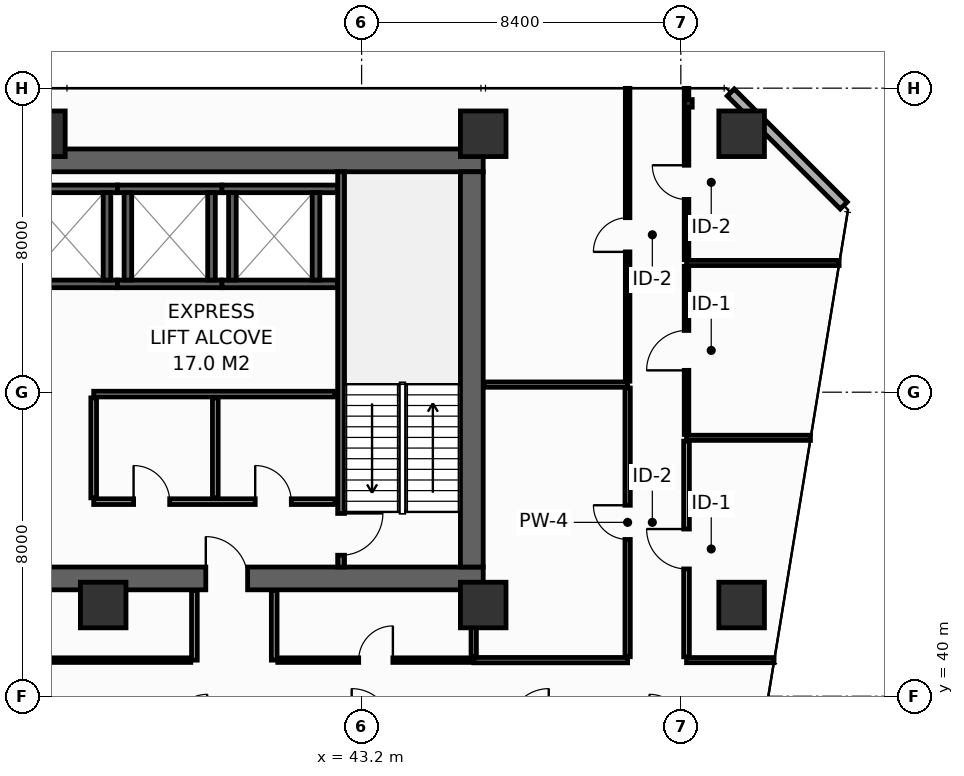
"""IFC4 building model, lengths in metres.
Left out: names, types, materials, properties, quantities, classifications, styles, units other than length and angle.
Written with IfcOpenShell. Run it as: python <this file> out.ifc"""

import sys

from ifc_helpers import new_model, si_unit, direction, frame, frame_2d, origin, origin_2d, place, context, subcontext, project, spatial, rectangle, hollow_rectangle, extrude, element, fill, save


model = new_model("IFC4")
c1 = context("Model", 3, precision=1e-05, world=origin(), true_north=direction((0.0, 1.0)))
c2 = subcontext(c1, "Body", "Model", "MODEL_VIEW")
j1 = project(units=[si_unit("LENGTHUNIT", "METRE"), si_unit("PLANEANGLEUNIT", "RADIAN")], contexts=[c1])
p1 = place(None, origin())
s1 = spatial("IfcSite", under=j1, at=p1, CompositionType="ELEMENT")
p2 = place(p1, origin())
s2 = spatial("IfcBuilding", under=s1, at=p2, CompositionType="ELEMENT")
p3 = place(p2, frame((0.0, 0.0, 97.2)))
s3 = spatial("IfcBuildingStorey", under=s2, at=p3, CompositionType="ELEMENT", Elevation=97.2)
p4 = place(p3, frame((13.5, 43.1, 0.0), z_axis=(0.0, 0.0, 1.0), x_axis=(1.0, 0.0, 0.0)))
e1 = element("IfcWall", 1, at=p4, inside=s3, PredefinedType="SHEAR", context=c2, shape_type="SweptSolid", body=[
    extrude(rectangle(XDim=32.9, YDim=0.6, at=frame_2d((16.45, 0.0))), origin(), (0.0, 0.0, 1.0), 4.15),
])
p5 = place(p4, frame((5.4, 0.0, 0.0)))
e2 = element("IfcOpeningElement", 2, at=p5, cuts=e1, PredefinedType="OPENING", context=c2, shape_type="SweptSolid", body=[
    extrude(rectangle(XDim=1.1, YDim=2.15, at=frame_2d((0.55, 1.075))), frame((0.0, 0.31, 0.0), z_axis=(0.0, -1.0, 0.0), x_axis=(1.0, 0.0, 0.0)), (0.0, 0.0, 1.0), 0.62),
])
p6 = place(p4, frame((25.6, 0.0, 0.0)))
e3 = element("IfcOpeningElement", 3, at=p6, cuts=e1, PredefinedType="OPENING", context=c2, shape_type="SweptSolid", body=[
    extrude(rectangle(XDim=1.1, YDim=2.15, at=frame_2d((0.55, 1.075))), frame((0.0, 0.31, 0.0), z_axis=(0.0, -1.0, 0.0), x_axis=(1.0, 0.0, 0.0)), (0.0, 0.0, 1.0), 0.62),
])
p7 = place(p3, frame((13.5, 54.1, 0.0), z_axis=(0.0, 0.0, 1.0), x_axis=(1.0, 0.0, 0.0)))
e4 = element("IfcWall", 4, at=p7, inside=s3, PredefinedType="SHEAR", context=c2, shape_type="SweptSolid", body=[
    extrude(rectangle(XDim=32.9, YDim=0.6, at=frame_2d((16.45, 0.0))), origin(), (0.0, 0.0, 1.0), 4.15),
])
p8 = place(p3, frame((46.1, 43.4, 0.0), z_axis=(0.0, 0.0, 1.0), x_axis=(0.0, 1.0, 0.0)))
e5 = element("IfcWall", 5, at=p8, inside=s3, PredefinedType="SHEAR", context=c2, shape_type="SweptSolid", body=[
    extrude(rectangle(XDim=10.4, YDim=0.6, at=frame_2d((5.2, 0.0))), origin(), (0.0, 0.0, 1.0), 4.15),
])
for number, where, z_axis, x_axis in (
    (6, (34.8, 54.8, 0.0), (0.0, 0.0, 1.0), (1.0, 0.0, 0.0)),
    (7, (46.4, 54.8, 0.0), (0.0, 0.0, 1.0), (1.0, 0.0, 0.0)),
    (8, (53.2, 54.8, 0.0), (0.0, 0.0, 1.0), (1.0, 0.0, 0.0)),
    (9, (36.4, 42.4, 0.0), (0.0, 0.0, 1.0), (1.0, 0.0, 0.0)),
    (10, (46.4, 42.4, 0.0), (0.0, 0.0, 1.0), (1.0, 0.0, 0.0)),
    (11, (53.2, 42.4, 0.0), (0.0, 0.0, 1.0), (1.0, 0.0, 0.0)),
):
    element("IfcColumn", number, at=place(p3, frame(where, z_axis=z_axis, x_axis=x_axis)), inside=s3, PredefinedType="COLUMN", context=c2, shape_type="SweptSolid", body=[
        extrude(hollow_rectangle(XDim=1.2, YDim=1.2, WallThickness=0.055, at=origin_2d()), origin(), (0.0, 0.0, 1.0), 4.4),
    ])
p9 = place(p3, frame((51.8, 55.6, 0.0), z_axis=(0.0, 0.0, 1.0), x_axis=(1.0, 0.0, 0.0)))
e12 = element("IfcColumn", 12, at=p9, inside=s3, PredefinedType="PILASTER", context=c2, shape_type="SweptSolid", body=[
    extrude(hollow_rectangle(XDim=0.2, YDim=0.2, WallThickness=0.01, at=origin_2d()), origin(), (0.0, 0.0, 1.0), 4.4),
])
for number, where, z_axis, x_axis in (
    (13, (33.95, 50.85, 0.0), (0.0, 0.0, 1.0), (1.0, 0.0, 0.0)),
    (14, (33.95, 53.35, 0.0), (0.0, 0.0, 1.0), (1.0, 0.0, 0.0)),
):
    element("IfcWall", number, at=place(p3, frame(where, z_axis=z_axis, x_axis=x_axis)), inside=s3, PredefinedType="SHEAR", context=c2, shape_type="SweptSolid", body=[
        extrude(rectangle(XDim=2.825, YDim=0.2, at=frame_2d((1.413, 0.0))), origin(), (0.0, 0.0, 1.0), 4.15),
    ])
p10 = place(p3, frame((36.5, 50.95, 0.0), z_axis=(0.0, 0.0, 1.0), x_axis=(0.0, 1.0, 0.0)))
e15 = element("IfcWall", 15, at=p10, inside=s3, PredefinedType="SHEAR", context=c2, shape_type="SweptSolid", body=[
    extrude(rectangle(XDim=2.3, YDim=0.2, at=frame_2d((1.15, 0.0))), origin(), (0.0, 0.0, 1.0), 4.15),
])
for number, where, z_axis, x_axis in (
    (16, (36.775, 50.85, 0.0), (0.0, 0.0, 1.0), (1.0, 0.0, 0.0)),
    (17, (36.775, 53.35, 0.0), (0.0, 0.0, 1.0), (1.0, 0.0, 0.0)),
):
    element("IfcWall", number, at=place(p3, frame(where, z_axis=z_axis, x_axis=x_axis)), inside=s3, PredefinedType="SHEAR", context=c2, shape_type="SweptSolid", body=[
        extrude(rectangle(XDim=2.75, YDim=0.2, at=frame_2d((1.375, 0.0))), origin(), (0.0, 0.0, 1.0), 4.15),
    ])
for number, where, z_axis, x_axis in (
    (18, (37.05, 50.95, 0.0), (0.0, 0.0, 1.0), (0.0, 1.0, 0.0)),
    (19, (39.25, 50.95, 0.0), (0.0, 0.0, 1.0), (0.0, 1.0, 0.0)),
):
    element("IfcWall", number, at=place(p3, frame(where, z_axis=z_axis, x_axis=x_axis)), inside=s3, PredefinedType="SHEAR", context=c2, shape_type="SweptSolid", body=[
        extrude(rectangle(XDim=2.3, YDim=0.2, at=frame_2d((1.15, 0.0))), origin(), (0.0, 0.0, 1.0), 4.15),
    ])
for number, where, z_axis, x_axis in (
    (20, (39.525, 50.85, 0.0), (0.0, 0.0, 1.0), (1.0, 0.0, 0.0)),
    (21, (39.525, 53.35, 0.0), (0.0, 0.0, 1.0), (1.0, 0.0, 0.0)),
):
    element("IfcWall", number, at=place(p3, frame(where, z_axis=z_axis, x_axis=x_axis)), inside=s3, PredefinedType="SHEAR", context=c2, shape_type="SweptSolid", body=[
        extrude(rectangle(XDim=3.045, YDim=0.2, at=frame_2d((1.522, 0.0))), origin(), (0.0, 0.0, 1.0), 4.15),
    ])
for number, where, z_axis, x_axis in (
    (22, (39.8, 50.95, 0.0), (0.0, 0.0, 1.0), (0.0, 1.0, 0.0)),
    (23, (42.0, 50.95, 0.0), (0.0, 0.0, 1.0), (0.0, 1.0, 0.0)),
):
    element("IfcWall", number, at=place(p3, frame(where, z_axis=z_axis, x_axis=x_axis)), inside=s3, PredefinedType="SHEAR", context=c2, shape_type="SweptSolid", body=[
        extrude(rectangle(XDim=2.3, YDim=0.2, at=frame_2d((1.15, 0.0))), origin(), (0.0, 0.0, 1.0), 4.15),
    ])
p11 = place(p3, frame((42.66, 53.8, 0.0), z_axis=(0.0, 0.0, 1.0), x_axis=(0.0, -1.0, 0.0)))
e24 = element("IfcWall", 24, at=p11, inside=s3, PredefinedType="SHEAR", context=c2, shape_type="SweptSolid", body=[
    extrude(rectangle(XDim=10.4, YDim=0.18, at=frame_2d((5.2, 0.0))), origin(), (0.0, 0.0, 1.0), 4.15),
])
p12 = place(p11, frame((8.99, 0.0, 0.0)))
e25 = element("IfcOpeningElement", 25, at=p12, cuts=e24, PredefinedType="OPENING", context=c2, shape_type="SweptSolid", body=[
    extrude(rectangle(XDim=1.1, YDim=2.15, at=frame_2d((0.55, 1.075))), frame((0.0, 0.1, 0.0), z_axis=(0.0, -1.0, 0.0), x_axis=(1.0, 0.0, 0.0)), (0.0, 0.0, 1.0), 0.2),
])
p13 = place(p3, frame((36.15, 45.12, 0.0), z_axis=(0.0, 0.0, 1.0), x_axis=(1.0, 0.0, 0.0)))
e26 = element("IfcWall", 26, at=p13, inside=s3, PredefinedType="PARTITIONING", context=c2, shape_type="SweptSolid", body=[
    extrude(rectangle(XDim=6.35, YDim=0.15, at=frame_2d((3.175, 0.0))), origin(), (0.0, 0.0, 1.0), 4.15),
])
p14 = place(p13, frame((1.05, 0.0, 0.0)))
e27 = element("IfcOpeningElement", 27, at=p14, cuts=e26, PredefinedType="OPENING", context=c2, shape_type="SweptSolid", body=[
    extrude(rectangle(XDim=0.95, YDim=2.15, at=frame_2d((0.475, 1.075))), frame((0.0, 0.085, 0.0), z_axis=(0.0, -1.0, 0.0), x_axis=(1.0, 0.0, 0.0)), (0.0, 0.0, 1.0), 0.17),
])
p15 = place(p13, frame((4.25, 0.0, 0.0)))
e28 = element("IfcOpeningElement", 28, at=p15, cuts=e26, PredefinedType="OPENING", context=c2, shape_type="SweptSolid", body=[
    extrude(rectangle(XDim=0.95, YDim=2.15, at=frame_2d((0.475, 1.075))), frame((0.0, 0.085, 0.0), z_axis=(0.0, -1.0, 0.0), x_axis=(1.0, 0.0, 0.0)), (0.0, 0.0, 1.0), 0.17),
])
p16 = place(p3, frame((36.15, 47.95, 0.0), z_axis=(0.0, 0.0, 1.0), x_axis=(1.0, 0.0, 0.0)))
e29 = element("IfcWall", 29, at=p16, inside=s3, PredefinedType="PARTITIONING", context=c2, shape_type="SweptSolid", body=[
    extrude(rectangle(XDim=6.35, YDim=0.15, at=frame_2d((3.175, 0.0))), origin(), (0.0, 0.0, 1.0), 4.15),
])
for number, where, z_axis, x_axis in (
    (30, (36.15, 45.22, 0.0), (0.0, 0.0, 1.0), (0.0, 1.0, 0.0)),
    (31, (39.35, 45.22, 0.0), (0.0, 0.0, 1.0), (0.0, 1.0, 0.0)),
):
    element("IfcWall", number, at=place(p3, frame(where, z_axis=z_axis, x_axis=x_axis)), inside=s3, PredefinedType="PARTITIONING", context=c2, shape_type="SweptSolid", body=[
        extrude(rectangle(XDim=2.63, YDim=0.15, at=frame_2d((1.315, 0.0))), origin(), (0.0, 0.0, 1.0), 4.15),
    ])
p17 = place(p3, frame((55.887, 52.913, 0.0), z_axis=(0.0, 0.0, 1.0), x_axis=(-0.707106781187, 0.707106781187, 0.0)))
e32 = element("IfcWall", 32, at=p17, inside=s3, PredefinedType="STANDARD", context=c2, shape_type="SweptSolid", body=[
    extrude(rectangle(XDim=4.206, YDim=0.26, at=frame_2d((2.103, 0.0))), origin(), (0.0, 0.0, 1.0), 4.15),
])
p18 = place(p3, frame((46.15, 40.95, 0.0), z_axis=(0.0, 0.0, 1.0), x_axis=(1.0, 0.0, 0.0)))
e33 = element("IfcWall", 33, at=p18, inside=s3, PredefinedType="PARTITIONING", context=c2, shape_type="SweptSolid", body=[
    extrude(rectangle(XDim=4.05, YDim=0.14, at=frame_2d((2.025, 0.0))), origin(), (0.0, 0.0, 1.0), 4.15),
])
p19 = place(p3, frame((46.15, 41.04, 0.0), z_axis=(0.0, 0.0, 1.0), x_axis=(0.0, 1.0, 0.0)))
e34 = element("IfcWall", 34, at=p19, inside=s3, PredefinedType="PARTITIONING", context=c2, shape_type="SweptSolid", body=[
    extrude(rectangle(XDim=1.74, YDim=0.14, at=frame_2d((0.87, 0.0))), origin(), (0.0, 0.0, 1.0), 4.15),
])
p20 = place(p3, frame((46.42, 48.2, 0.0), z_axis=(0.0, 0.0, 1.0), x_axis=(1.0, 0.0, 0.0)))
e35 = element("IfcWall", 35, at=p20, inside=s3, PredefinedType="PARTITIONING", context=c2, shape_type="SweptSolid", body=[
    extrude(rectangle(XDim=3.78, YDim=0.14, at=frame_2d((1.89, 0.0))), origin(), (0.0, 0.0, 1.0), 4.15),
])
p21 = place(p3, frame((50.2, 41.04, 0.0), z_axis=(0.0, 0.0, 1.0), x_axis=(0.0, 1.0, 0.0)))
e36 = element("IfcWall", 36, at=p21, inside=s3, PredefinedType="PARTITIONING", context=c2, shape_type="SweptSolid", body=[
    extrude(rectangle(XDim=7.07, YDim=0.14, at=frame_2d((3.535, 0.0))), origin(), (0.0, 0.0, 1.0), 3.335),
])
p22 = place(p21, frame((3.085, 0.0, 0.0)))
e37 = element("IfcOpeningElement", 37, at=p22, cuts=e36, PredefinedType="OPENING", context=c2, shape_type="SweptSolid", body=[
    extrude(rectangle(XDim=0.9, YDim=2.1, at=frame_2d((0.45, 1.05))), frame((0.0, 0.08, 0.0), z_axis=(0.0, -1.0, 0.0), x_axis=(1.0, 0.0, 0.0)), (0.0, 0.0, 1.0), 0.16),
])
p23 = place(p3, frame((50.2, 48.29, 0.0), z_axis=(0.0, 0.0, 1.0), x_axis=(0.0, 1.0, 0.0)))
e38 = element("IfcWall", 38, at=p23, inside=s3, PredefinedType="PARTITIONING", context=c2, shape_type="SweptSolid", body=[
    extrude(rectangle(XDim=7.705, YDim=0.12, at=frame_2d((3.853, 0.0))), origin(), (0.0, 0.0, 1.0), 3.435),
])
p24 = place(p23, frame((3.402, 0.0, 0.0)))
e39 = element("IfcOpeningElement", 39, at=p24, cuts=e38, PredefinedType="OPENING", context=c2, shape_type="SweptSolid", body=[
    extrude(rectangle(XDim=0.9, YDim=2.1, at=frame_2d((0.45, 1.05))), frame((0.0, 0.07, 0.0), z_axis=(0.0, -1.0, 0.0), x_axis=(1.0, 0.0, 0.0)), (0.0, 0.0, 1.0), 0.14),
])
p25 = place(p3, frame((51.75, 40.95, 0.0), z_axis=(0.0, 0.0, 1.0), x_axis=(1.0, 0.0, 0.0)))
e40 = element("IfcWall", 40, at=p25, inside=s3, PredefinedType="PARTITIONING", context=c2, shape_type="SweptSolid", body=[
    extrude(rectangle(XDim=2.303, YDim=0.135, at=frame_2d((1.151, 0.0))), origin(), (0.0, 0.0, 1.0), 3.635),
])
p26 = place(p3, frame((51.75, 46.8, 0.0), z_axis=(0.0, 0.0, 1.0), x_axis=(1.0, 0.0, 0.0)))
e41 = element("IfcWall", 41, at=p26, inside=s3, PredefinedType="PARTITIONING", context=c2, shape_type="SweptSolid", body=[
    extrude(rectangle(XDim=3.262, YDim=0.135, at=frame_2d((1.631, 0.0))), origin(), (0.0, 0.0, 1.0), 3.335),
])
p27 = place(p3, frame((51.75, 51.4, 0.0), z_axis=(0.0, 0.0, 1.0), x_axis=(1.0, 0.0, 0.0)))
e42 = element("IfcWall", 42, at=p27, inside=s3, PredefinedType="PARTITIONING", context=c2, shape_type="SweptSolid", body=[
    extrude(rectangle(XDim=4.015, YDim=0.135, at=frame_2d((2.008, 0.0))), origin(), (0.0, 0.0, 1.0), 3.335),
])
p28 = place(p3, frame((51.75, 41.038, 0.0), z_axis=(0.0, 0.0, 1.0), x_axis=(0.0, 1.0, 0.0)))
e43 = element("IfcWall", 43, at=p28, inside=s3, PredefinedType="PARTITIONING", context=c2, shape_type="SweptSolid", body=[
    extrude(rectangle(XDim=5.675, YDim=0.15, at=frame_2d((2.837, 0.0))), origin(), (0.0, 0.0, 1.0), 3.335),
])
p29 = place(p28, frame((2.312, 0.0, 0.0)))
e44 = element("IfcOpeningElement", 44, at=p29, cuts=e43, PredefinedType="OPENING", context=c2, shape_type="SweptSolid", body=[
    extrude(rectangle(XDim=1.05, YDim=2.15, at=frame_2d((0.525, 1.075))), frame((0.0, 0.085, 0.0), z_axis=(0.0, -1.0, 0.0), x_axis=(1.0, 0.0, 0.0)), (0.0, 0.0, 1.0), 0.17),
])
p30 = place(p3, frame((51.75, 46.887, 0.0), z_axis=(0.0, 0.0, 1.0), x_axis=(0.0, 1.0, 0.0)))
e45 = element("IfcWall", 45, at=p30, inside=s3, PredefinedType="PARTITIONING", context=c2, shape_type="SweptSolid", body=[
    extrude(rectangle(XDim=4.425, YDim=0.12, at=frame_2d((2.212, 0.0))), origin(), (0.0, 0.0, 1.0), 4.15),
])
p31 = place(p30, frame((1.687, 0.0, 0.0)))
e46 = element("IfcOpeningElement", 46, at=p31, cuts=e45, PredefinedType="OPENING", context=c2, shape_type="SweptSolid", body=[
    extrude(rectangle(XDim=1.05, YDim=2.15, at=frame_2d((0.525, 1.075))), frame((0.0, 0.07, 0.0), z_axis=(0.0, -1.0, 0.0), x_axis=(1.0, 0.0, 0.0)), (0.0, 0.0, 1.0), 0.14),
])
p32 = place(p3, frame((51.75, 51.488, 0.0), z_axis=(0.0, 0.0, 1.0), x_axis=(0.0, 1.0, 0.0)))
e47 = element("IfcWall", 47, at=p32, inside=s3, PredefinedType="PARTITIONING", context=c2, shape_type="SweptSolid", body=[
    extrude(rectangle(XDim=4.508, YDim=0.12, at=frame_2d((2.254, 0.0))), origin(), (0.0, 0.0, 1.0), 3.435),
])
p33 = place(p32, frame((1.584, 0.0, 0.0)))
e48 = element("IfcOpeningElement", 48, at=p33, cuts=e47, PredefinedType="OPENING", context=c2, shape_type="SweptSolid", body=[
    extrude(rectangle(XDim=0.9, YDim=2.1, at=frame_2d((0.45, 1.05))), frame((0.0, 0.07, 0.0), z_axis=(0.0, -1.0, 0.0), x_axis=(1.0, 0.0, 0.0)), (0.0, 0.0, 1.0), 0.14),
])
for number, where, z_axis, x_axis in (
    (49, (38.8, 40.95, 0.0), (0.0, 0.0, 1.0), (0.0, 1.0, 0.0)),
    (50, (40.9, 40.95, 0.0), (0.0, 0.0, 1.0), (0.0, 1.0, 0.0)),
):
    element("IfcWall", number, at=place(p3, frame(where, z_axis=z_axis, x_axis=x_axis)), inside=s3, PredefinedType="PARTITIONING", context=c2, shape_type="SweptSolid", body=[
        extrude(rectangle(XDim=1.83, YDim=0.15, at=frame_2d((0.915, 0.0))), origin(), (0.0, 0.0, 1.0), 4.15),
    ])
p34 = place(p3, frame((30.08, 40.95, 0.0), z_axis=(0.0, 0.0, 1.0), x_axis=(1.0, 0.0, 0.0)))
e51 = element("IfcWall", 51, at=p34, inside=s3, PredefinedType="PARTITIONING", context=c2, shape_type="SweptSolid", body=[
    extrude(rectangle(XDim=8.625, YDim=0.12, at=frame_2d((4.312, 0.0))), origin(), (0.0, 0.0, 1.0), 2.735),
])
p35 = place(p34, frame((3.788, 0.0, 0.0)))
e52 = element("IfcOpeningElement", 52, at=p35, cuts=e51, PredefinedType="OPENING", context=c2, shape_type="SweptSolid", body=[
    extrude(rectangle(XDim=1.05, YDim=2.15, at=frame_2d((0.525, 1.075))), frame((0.0, 0.07, 0.0), z_axis=(0.0, -1.0, 0.0), x_axis=(1.0, 0.0, 0.0)), (0.0, 0.0, 1.0), 0.14),
])
p36 = place(p3, frame((40.995, 40.95, 0.0), z_axis=(0.0, 0.0, 1.0), x_axis=(1.0, 0.0, 0.0)))
e53 = element("IfcWall", 53, at=p36, inside=s3, PredefinedType="PARTITIONING", context=c2, shape_type="SweptSolid", body=[
    extrude(rectangle(XDim=5.155, YDim=0.12, at=frame_2d((2.577, 0.0))), origin(), (0.0, 0.0, 1.0), 4.15),
])
p37 = place(p36, frame((2.128, 0.0, 0.0)))
e54 = element("IfcOpeningElement", 54, at=p37, cuts=e53, PredefinedType="OPENING", context=c2, shape_type="SweptSolid", body=[
    extrude(rectangle(XDim=0.9, YDim=2.1, at=frame_2d((0.45, 1.05))), frame((0.0, 0.07, 0.0), z_axis=(0.0, -1.0, 0.0), x_axis=(1.0, 0.0, 0.0)), (0.0, 0.0, 1.0), 0.14),
])
p38 = place(p12, origin())
e55 = element("IfcDoor", 55, at=p38, inside=s3, OperationType="SINGLE_SWING_LEFT", PredefinedType="DOOR", context=c2, shape_type="SweptSolid", body=[
    extrude(rectangle(XDim=1.1, YDim=2.15, at=frame_2d((0.55, 1.075))), frame((0.0, 0.025, 0.0), z_axis=(0.0, -1.0, 0.0), x_axis=(1.0, 0.0, 0.0)), (0.0, 0.0, 1.0), 0.05),
])
fill(e25, e55)
p39 = place(p6, origin())
e56 = element("IfcDoor", 56, at=p39, inside=s3, OperationType="SINGLE_SWING_LEFT", PredefinedType="DOOR", context=c2, shape_type="SweptSolid", body=[
    extrude(rectangle(XDim=1.1, YDim=2.15, at=frame_2d((0.55, 1.075))), frame((0.0, 0.025, 0.0), z_axis=(0.0, -1.0, 0.0), x_axis=(1.0, 0.0, 0.0)), (0.0, 0.0, 1.0), 0.05),
])
fill(e3, e56)
p40 = place(p14, origin())
e57 = element("IfcDoor", 57, at=p40, inside=s3, OperationType="SINGLE_SWING_LEFT", PredefinedType="DOOR", context=c2, shape_type="SweptSolid", body=[
    extrude(rectangle(XDim=0.95, YDim=2.15, at=frame_2d((0.475, 1.075))), frame((0.0, 0.025, 0.0), z_axis=(0.0, -1.0, 0.0), x_axis=(1.0, 0.0, 0.0)), (0.0, 0.0, 1.0), 0.05),
])
fill(e27, e57)
p41 = place(p15, origin())
e58 = element("IfcDoor", 58, at=p41, inside=s3, OperationType="SINGLE_SWING_LEFT", PredefinedType="DOOR", context=c2, shape_type="SweptSolid", body=[
    extrude(rectangle(XDim=0.95, YDim=2.15, at=frame_2d((0.475, 1.075))), frame((0.0, 0.025, 0.0), z_axis=(0.0, -1.0, 0.0), x_axis=(1.0, 0.0, 0.0)), (0.0, 0.0, 1.0), 0.05),
])
fill(e28, e58)
p42 = place(p22, origin())
e59 = element("IfcDoor", 59, at=p42, inside=s3, OperationType="SINGLE_SWING_RIGHT", PredefinedType="DOOR", context=c2, shape_type="SweptSolid", body=[
    extrude(rectangle(XDim=0.9, YDim=2.1, at=frame_2d((0.45, 1.05))), frame((0.0, 0.025, 0.0), z_axis=(0.0, -1.0, 0.0), x_axis=(1.0, 0.0, 0.0)), (0.0, 0.0, 1.0), 0.05),
])
fill(e37, e59)
p43 = place(p24, origin())
e60 = element("IfcDoor", 60, at=p43, inside=s3, OperationType="SINGLE_SWING_LEFT", PredefinedType="DOOR", context=c2, shape_type="SweptSolid", body=[
    extrude(rectangle(XDim=0.9, YDim=2.1, at=frame_2d((0.45, 1.05))), frame((0.0, 0.025, 0.0), z_axis=(0.0, -1.0, 0.0), x_axis=(1.0, 0.0, 0.0)), (0.0, 0.0, 1.0), 0.05),
])
fill(e39, e60)
p44 = place(p29, origin())
e61 = element("IfcDoor", 61, at=p44, inside=s3, OperationType="SINGLE_SWING_RIGHT", PredefinedType="DOOR", context=c2, shape_type="SweptSolid", body=[
    extrude(rectangle(XDim=1.05, YDim=2.15, at=frame_2d((0.525, 1.075))), frame((0.0, 0.025, 0.0), z_axis=(0.0, -1.0, 0.0), x_axis=(1.0, 0.0, 0.0)), (0.0, 0.0, 1.0), 0.05),
])
fill(e44, e61)
p45 = place(p31, origin())
e62 = element("IfcDoor", 62, at=p45, inside=s3, OperationType="SINGLE_SWING_LEFT", PredefinedType="DOOR", context=c2, shape_type="SweptSolid", body=[
    extrude(rectangle(XDim=1.05, YDim=2.15, at=frame_2d((0.525, 1.075))), frame((0.0, 0.025, 0.0), z_axis=(0.0, -1.0, 0.0), x_axis=(1.0, 0.0, 0.0)), (0.0, 0.0, 1.0), 0.05),
])
fill(e46, e62)
p46 = place(p33, origin())
e63 = element("IfcDoor", 63, at=p46, inside=s3, OperationType="SINGLE_SWING_RIGHT", PredefinedType="DOOR", context=c2, shape_type="SweptSolid", body=[
    extrude(rectangle(XDim=0.9, YDim=2.1, at=frame_2d((0.45, 1.05))), frame((0.0, 0.025, 0.0), z_axis=(0.0, -1.0, 0.0), x_axis=(1.0, 0.0, 0.0)), (0.0, 0.0, 1.0), 0.05),
])
fill(e48, e63)
p47 = place(p37, origin())
e64 = element("IfcDoor", 64, at=p47, inside=s3, OperationType="SINGLE_SWING_RIGHT", PredefinedType="DOOR", context=c2, shape_type="SweptSolid", body=[
    extrude(rectangle(XDim=0.9, YDim=2.1, at=frame_2d((0.45, 1.05))), frame((0.0, 0.025, 0.0), z_axis=(0.0, -1.0, 0.0), x_axis=(1.0, 0.0, 0.0)), (0.0, 0.0, 1.0), 0.05),
])
fill(e54, e64)
save(model, sys.argv[1])
